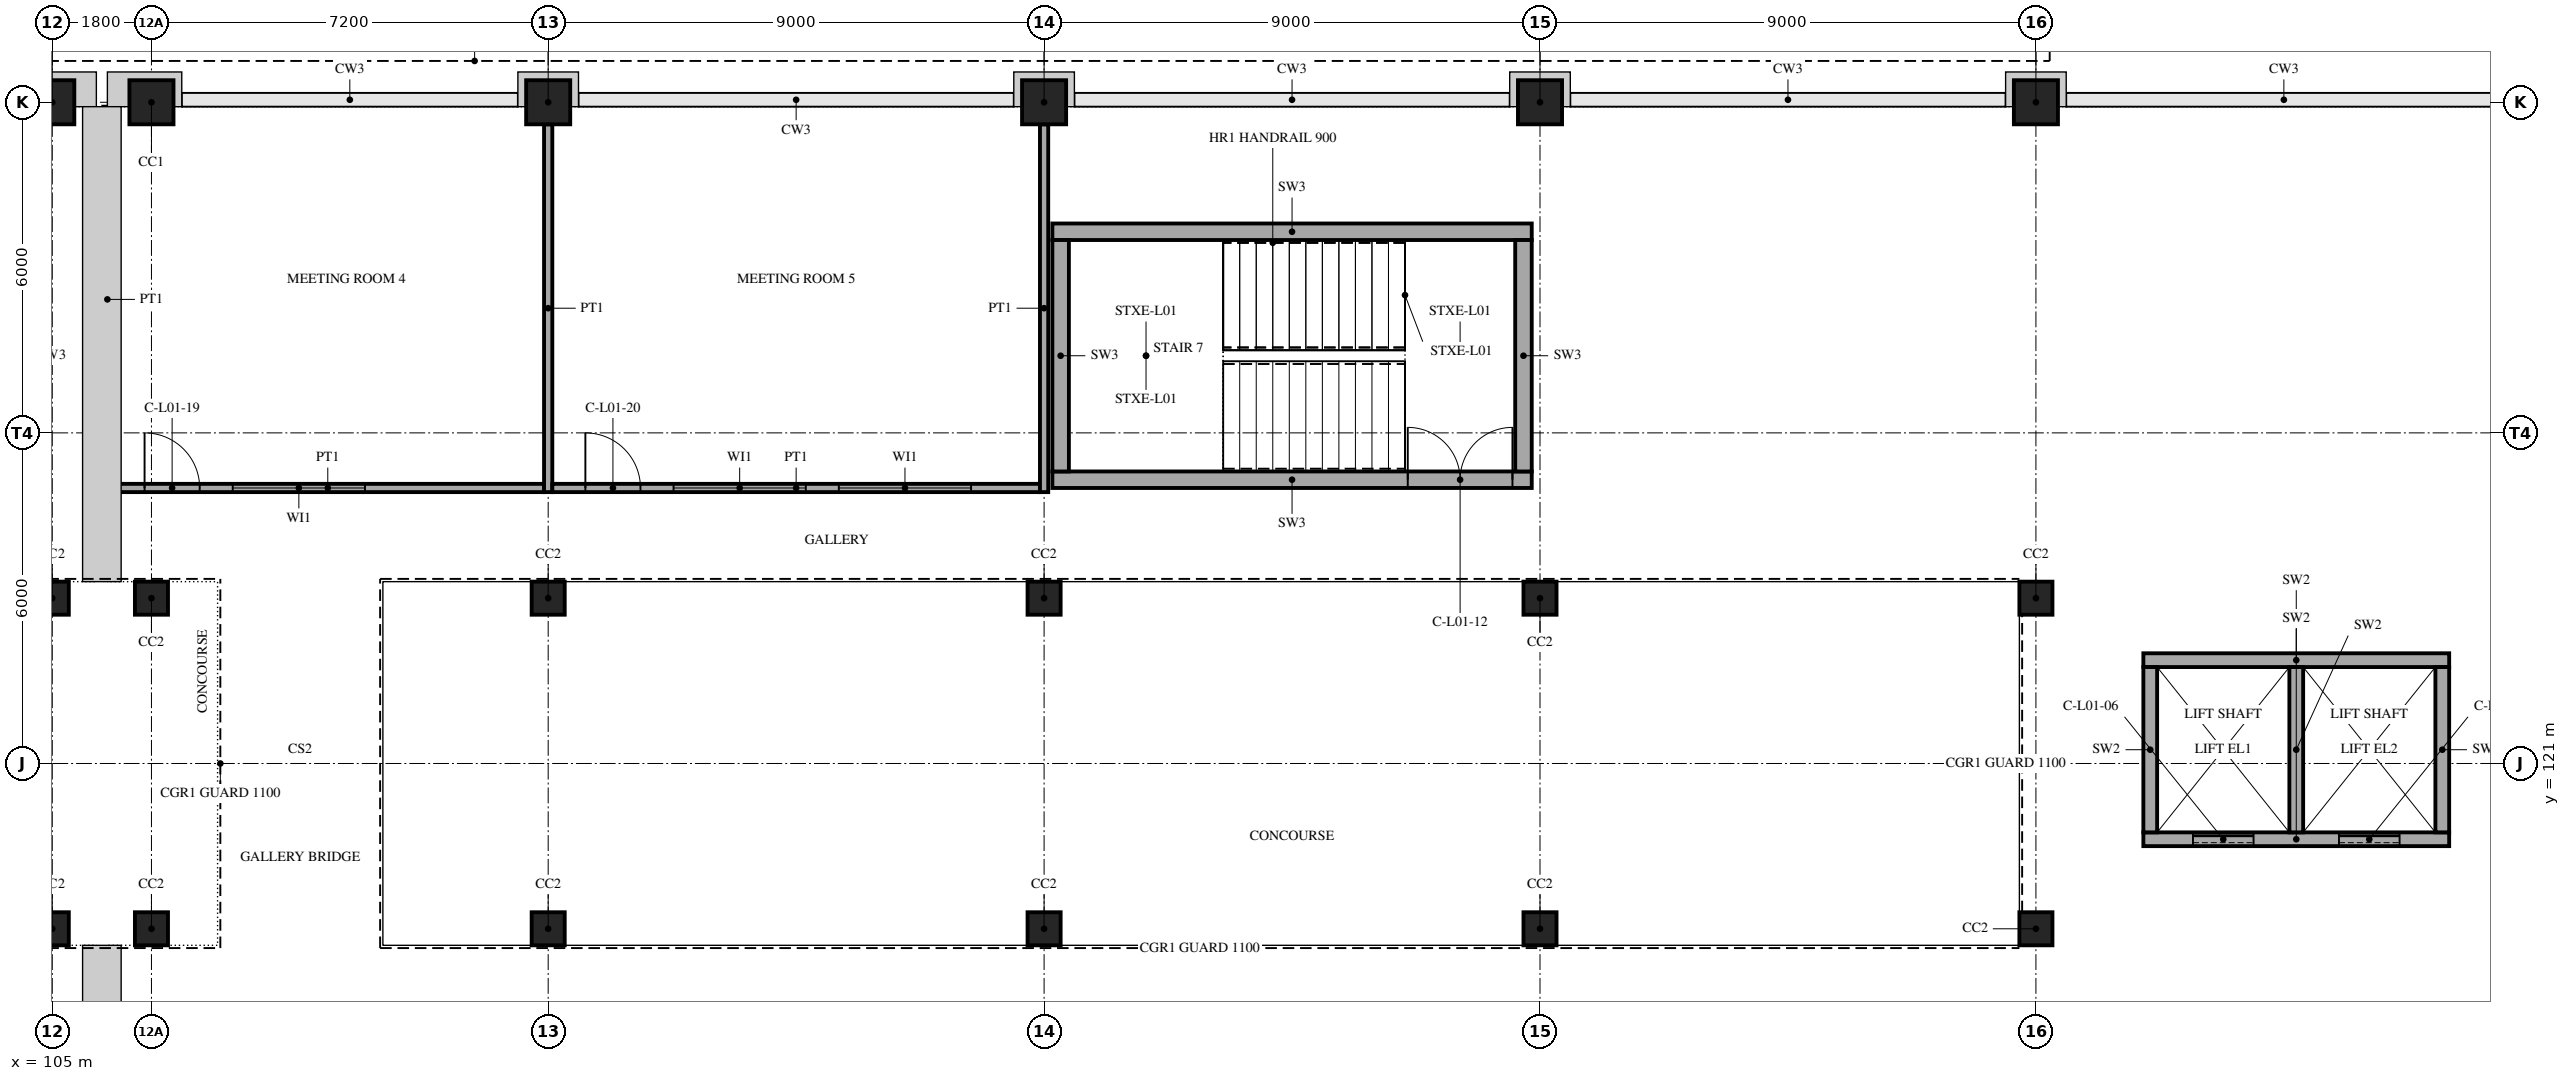
"""IFC4 building model, lengths in metres.
Left out: names, types, materials, properties, quantities, classifications, styles, units other than length and angle.
Written with IfcOpenShell. Run it as: python <this file> out.ifc"""

import sys

from ifc_helpers import new_model, si_unit, direction, frame, frame_2d, origin, origin_2d, place, context, subcontext, project, spatial, rectangle, extrude, element, fill, save


model = new_model("IFC4")
c1 = context("Model", 3, precision=1e-05, world=origin(), true_north=direction((0.0, 1.0)))
c2 = subcontext(c1, "Body", "Model", "MODEL_VIEW")
j1 = project(units=[si_unit("LENGTHUNIT", "METRE"), si_unit("PLANEANGLEUNIT", "RADIAN")], contexts=[c1])
p1 = place(None, origin())
s1 = spatial("IfcSite", under=j1, at=p1, CompositionType="ELEMENT")
p2 = place(p1, origin())
s2 = spatial("IfcBuilding", under=s1, at=p2, CompositionType="ELEMENT")
p3 = place(p2, frame((0.0, 0.0, 5.0)))
s3 = spatial("IfcBuildingStorey", under=s2, at=p3, CompositionType="ELEMENT", Elevation=5.0)
for number, where, z_axis, x_axis in (
    (1, (105.0, 118.0, 0.0), (0.0, 0.0, 1.0), (1.0, 0.0, 0.0)),
    (2, (105.0, 124.0, 0.0), (0.0, 0.0, 1.0), (1.0, 0.0, 0.0)),
):
    element("IfcColumn", number, at=place(p3, frame(where, z_axis=z_axis, x_axis=x_axis)), inside=s3, PredefinedType="COLUMN", context=c2, shape_type="SweptSolid", body=[
        extrude(rectangle(XDim=0.6, YDim=0.6, at=origin_2d()), origin(), (0.0, 0.0, 1.0), 5.0),
    ])
p4 = place(p3, frame((105.0, 133.0, 0.0), z_axis=(0.0, 0.0, 1.0), x_axis=(1.0, 0.0, 0.0)))
e3 = element("IfcColumn", 3, at=p4, inside=s3, PredefinedType="COLUMN", context=c2, shape_type="SweptSolid", body=[
    extrude(rectangle(XDim=0.8, YDim=0.8, at=origin_2d()), origin(), (0.0, 0.0, 1.0), 5.0),
])
for number, where, z_axis, x_axis in (
    (4, (106.8, 118.0, 0.0), (0.0, 0.0, 1.0), (1.0, 0.0, 0.0)),
    (5, (106.8, 124.0, 0.0), (0.0, 0.0, 1.0), (1.0, 0.0, 0.0)),
):
    element("IfcColumn", number, at=place(p3, frame(where, z_axis=z_axis, x_axis=x_axis)), inside=s3, PredefinedType="COLUMN", context=c2, shape_type="SweptSolid", body=[
        extrude(rectangle(XDim=0.6, YDim=0.6, at=origin_2d()), origin(), (0.0, 0.0, 1.0), 5.0),
    ])
p5 = place(p3, frame((106.8, 133.0, 0.0), z_axis=(0.0, 0.0, 1.0), x_axis=(1.0, 0.0, 0.0)))
e6 = element("IfcColumn", 6, at=p5, inside=s3, PredefinedType="COLUMN", context=c2, shape_type="SweptSolid", body=[
    extrude(rectangle(XDim=0.8, YDim=0.8, at=origin_2d()), origin(), (0.0, 0.0, 1.0), 5.0),
])
for number, where, z_axis, x_axis in (
    (7, (114.0, 118.0, 0.0), (0.0, 0.0, 1.0), (1.0, 0.0, 0.0)),
    (8, (114.0, 124.0, 0.0), (0.0, 0.0, 1.0), (1.0, 0.0, 0.0)),
):
    element("IfcColumn", number, at=place(p3, frame(where, z_axis=z_axis, x_axis=x_axis)), inside=s3, PredefinedType="COLUMN", context=c2, shape_type="SweptSolid", body=[
        extrude(rectangle(XDim=0.6, YDim=0.6, at=origin_2d()), origin(), (0.0, 0.0, 1.0), 5.0),
    ])
p6 = place(p3, frame((114.0, 133.0, 0.0), z_axis=(0.0, 0.0, 1.0), x_axis=(1.0, 0.0, 0.0)))
e9 = element("IfcColumn", 9, at=p6, inside=s3, PredefinedType="COLUMN", context=c2, shape_type="SweptSolid", body=[
    extrude(rectangle(XDim=0.8, YDim=0.8, at=origin_2d()), origin(), (0.0, 0.0, 1.0), 5.0),
])
for number, where, z_axis, x_axis in (
    (10, (123.0, 118.0, 0.0), (0.0, 0.0, 1.0), (1.0, 0.0, 0.0)),
    (11, (123.0, 124.0, 0.0), (0.0, 0.0, 1.0), (1.0, 0.0, 0.0)),
):
    element("IfcColumn", number, at=place(p3, frame(where, z_axis=z_axis, x_axis=x_axis)), inside=s3, PredefinedType="COLUMN", context=c2, shape_type="SweptSolid", body=[
        extrude(rectangle(XDim=0.6, YDim=0.6, at=origin_2d()), origin(), (0.0, 0.0, 1.0), 5.0),
    ])
p7 = place(p3, frame((123.0, 133.0, 0.0), z_axis=(0.0, 0.0, 1.0), x_axis=(1.0, 0.0, 0.0)))
e12 = element("IfcColumn", 12, at=p7, inside=s3, PredefinedType="COLUMN", context=c2, shape_type="SweptSolid", body=[
    extrude(rectangle(XDim=0.8, YDim=0.8, at=origin_2d()), origin(), (0.0, 0.0, 1.0), 5.0),
])
for number, where, z_axis, x_axis in (
    (13, (132.0, 118.0, 0.0), (0.0, 0.0, 1.0), (1.0, 0.0, 0.0)),
    (14, (132.0, 124.0, 0.0), (0.0, 0.0, 1.0), (1.0, 0.0, 0.0)),
):
    element("IfcColumn", number, at=place(p3, frame(where, z_axis=z_axis, x_axis=x_axis)), inside=s3, PredefinedType="COLUMN", context=c2, shape_type="SweptSolid", body=[
        extrude(rectangle(XDim=0.6, YDim=0.6, at=origin_2d()), origin(), (0.0, 0.0, 1.0), 5.0),
    ])
p8 = place(p3, frame((132.0, 133.0, 0.0), z_axis=(0.0, 0.0, 1.0), x_axis=(1.0, 0.0, 0.0)))
e15 = element("IfcColumn", 15, at=p8, inside=s3, PredefinedType="COLUMN", context=c2, shape_type="SweptSolid", body=[
    extrude(rectangle(XDim=0.8, YDim=0.8, at=origin_2d()), origin(), (0.0, 0.0, 1.0), 5.0),
])
for number, where, z_axis, x_axis in (
    (16, (141.0, 118.0, 0.0), (0.0, 0.0, 1.0), (1.0, 0.0, 0.0)),
    (17, (141.0, 124.0, 0.0), (0.0, 0.0, 1.0), (1.0, 0.0, 0.0)),
):
    element("IfcColumn", number, at=place(p3, frame(where, z_axis=z_axis, x_axis=x_axis)), inside=s3, PredefinedType="COLUMN", context=c2, shape_type="SweptSolid", body=[
        extrude(rectangle(XDim=0.6, YDim=0.6, at=origin_2d()), origin(), (0.0, 0.0, 1.0), 5.0),
    ])
p9 = place(p3, frame((141.0, 133.0, 0.0), z_axis=(0.0, 0.0, 1.0), x_axis=(1.0, 0.0, 0.0)))
e18 = element("IfcColumn", 18, at=p9, inside=s3, PredefinedType="COLUMN", context=c2, shape_type="SweptSolid", body=[
    extrude(rectangle(XDim=0.8, YDim=0.8, at=origin_2d()), origin(), (0.0, 0.0, 1.0), 5.0),
])
p10 = place(p3, frame((142.95, 119.625, 0.0), z_axis=(0.0, 0.0, 1.0), x_axis=(1.0, 0.0, 0.0)))
e19 = element("IfcWall", 19, at=p10, inside=s3, PredefinedType="SHEAR", context=c2, shape_type="SweptSolid", body=[
    extrude(rectangle(XDim=5.55, YDim=0.25, at=frame_2d((2.775, 0.0))), origin(), (0.0, 0.0, 1.0), 5.0),
])
p11 = place(p10, frame((0.9, 0.0, 0.0)))
e20 = element("IfcOpeningElement", 20, at=p11, cuts=e19, PredefinedType="OPENING", context=c2, shape_type="SweptSolid", body=[
    extrude(rectangle(XDim=1.1, YDim=2.1, at=frame_2d((0.55, 1.05))), frame((0.0, 0.135, 0.0), z_axis=(0.0, -1.0, 0.0), x_axis=(1.0, 0.0, 0.0)), (0.0, 0.0, 1.0), 0.27),
])
p12 = place(p10, frame((3.55, 0.0, 0.0)))
e21 = element("IfcOpeningElement", 21, at=p12, cuts=e19, PredefinedType="OPENING", context=c2, shape_type="SweptSolid", body=[
    extrude(rectangle(XDim=1.1, YDim=2.1, at=frame_2d((0.55, 1.05))), frame((0.0, 0.135, 0.0), z_axis=(0.0, -1.0, 0.0), x_axis=(1.0, 0.0, 0.0)), (0.0, 0.0, 1.0), 0.27),
])
p13 = place(p3, frame((142.95, 122.875, 0.0), z_axis=(0.0, 0.0, 1.0), x_axis=(1.0, 0.0, 0.0)))
e22 = element("IfcWall", 22, at=p13, inside=s3, PredefinedType="SHEAR", context=c2, shape_type="SweptSolid", body=[
    extrude(rectangle(XDim=5.55, YDim=0.25, at=frame_2d((2.775, 0.0))), origin(), (0.0, 0.0, 1.0), 5.0),
])
for number, where, z_axis, x_axis in (
    (23, (143.075, 119.75, 0.0), (0.0, 0.0, 1.0), (0.0, 1.0, 0.0)),
    (24, (148.375, 119.75, 0.0), (0.0, 0.0, 1.0), (0.0, 1.0, 0.0)),
    (25, (145.725, 119.75, 0.0), (0.0, 0.0, 1.0), (0.0, 1.0, 0.0)),
):
    element("IfcWall", number, at=place(p3, frame(where, z_axis=z_axis, x_axis=x_axis)), inside=s3, PredefinedType="SHEAR", context=c2, shape_type="SweptSolid", body=[
        extrude(rectangle(XDim=3.0, YDim=0.25, at=frame_2d((1.5, 0.0))), origin(), (0.0, 0.0, 1.0), 5.0),
    ])
p14 = place(p3, frame((123.15, 126.15, 0.0), z_axis=(0.0, 0.0, 1.0), x_axis=(1.0, 0.0, 0.0)))
e26 = element("IfcWall", 26, at=p14, inside=s3, PredefinedType="SHEAR", context=c2, shape_type="SweptSolid", body=[
    extrude(rectangle(XDim=8.7, YDim=0.3, at=frame_2d((4.35, 0.0))), origin(), (0.0, 0.0, 1.0), 5.0),
])
p15 = place(p14, frame((6.45, 0.0, 0.0)))
e27 = element("IfcOpeningElement", 27, at=p15, cuts=e26, PredefinedType="OPENING", context=c2, shape_type="SweptSolid", body=[
    extrude(rectangle(XDim=1.9, YDim=2.1, at=frame_2d((0.95, 1.05))), frame((0.0, 0.16, 0.0), z_axis=(0.0, -1.0, 0.0), x_axis=(1.0, 0.0, 0.0)), (0.0, 0.0, 1.0), 0.32),
])
p16 = place(p3, frame((123.15, 130.65, 0.0), z_axis=(0.0, 0.0, 1.0), x_axis=(1.0, 0.0, 0.0)))
e28 = element("IfcWall", 28, at=p16, inside=s3, PredefinedType="SHEAR", context=c2, shape_type="SweptSolid", body=[
    extrude(rectangle(XDim=8.7, YDim=0.3, at=frame_2d((4.35, 0.0))), origin(), (0.0, 0.0, 1.0), 5.0),
])
for number, where, z_axis, x_axis in (
    (29, (123.3, 126.3, 0.0), (0.0, 0.0, 1.0), (0.0, 1.0, 0.0)),
    (30, (131.7, 126.3, 0.0), (0.0, 0.0, 1.0), (0.0, 1.0, 0.0)),
):
    element("IfcWall", number, at=place(p3, frame(where, z_axis=z_axis, x_axis=x_axis)), inside=s3, PredefinedType="SHEAR", context=c2, shape_type="SweptSolid", body=[
        extrude(rectangle(XDim=4.2, YDim=0.3, at=frame_2d((2.1, 0.0))), origin(), (0.0, 0.0, 1.0), 5.0),
    ])
p17 = place(p3, frame((106.075, 126.0, 0.0), z_axis=(0.0, 0.0, 1.0), x_axis=(1.0, 0.0, 0.0)))
e31 = element("IfcWall", 31, at=p17, inside=s3, PredefinedType="PARTITIONING", context=c2, shape_type="SweptSolid", body=[
    extrude(rectangle(XDim=7.85, YDim=0.15, at=frame_2d((3.925, 0.0))), origin(), (0.0, 0.0, 1.0), 4.8),
])
p18 = place(p17, frame((0.6, 0.0, 0.0)))
e32 = element("IfcOpeningElement", 32, at=p18, cuts=e31, PredefinedType="OPENING", context=c2, shape_type="SweptSolid", body=[
    extrude(rectangle(XDim=1.0, YDim=2.1, at=frame_2d((0.5, 1.05))), frame((0.0, 0.085, 0.0), z_axis=(0.0, -1.0, 0.0), x_axis=(1.0, 0.0, 0.0)), (0.0, 0.0, 1.0), 0.17),
])
p19 = place(p17, frame((2.2, 0.0, 0.9)))
e33 = element("IfcOpeningElement", 33, at=p19, cuts=e31, PredefinedType="OPENING", context=c2, shape_type="SweptSolid", body=[
    extrude(rectangle(XDim=2.4, YDim=1.5, at=frame_2d((1.2, 0.75))), frame((0.0, 0.085, 0.0), z_axis=(0.0, -1.0, 0.0), x_axis=(1.0, 0.0, 0.0)), (0.0, 0.0, 1.0), 0.17),
])
p20 = place(p3, frame((106.0, 125.925, 0.0), z_axis=(0.0, 0.0, 1.0), x_axis=(0.0, 1.0, 0.0)))
e34 = element("IfcWall", 34, at=p20, inside=s3, PredefinedType="PARTITIONING", context=c2, shape_type="SweptSolid", body=[
    extrude(rectangle(XDim=6.995, YDim=0.15, at=frame_2d((3.498, 0.0))), origin(), (0.0, 0.0, 1.0), 4.8),
])
p21 = place(p3, frame((114.0, 125.925, 0.0), z_axis=(0.0, 0.0, 1.0), x_axis=(0.0, 1.0, 0.0)))
e35 = element("IfcWall", 35, at=p21, inside=s3, PredefinedType="PARTITIONING", context=c2, shape_type="SweptSolid", body=[
    extrude(rectangle(XDim=6.675, YDim=0.15, at=frame_2d((3.337, 0.0))), origin(), (0.0, 0.0, 1.0), 4.0),
])
p22 = place(p3, frame((114.075, 126.0, 0.0), z_axis=(0.0, 0.0, 1.0), x_axis=(1.0, 0.0, 0.0)))
e36 = element("IfcWall", 36, at=p22, inside=s3, PredefinedType="PARTITIONING", context=c2, shape_type="SweptSolid", body=[
    extrude(rectangle(XDim=8.85, YDim=0.15, at=frame_2d((4.425, 0.0))), origin(), (0.0, 0.0, 1.0), 4.8),
])
p23 = place(p22, frame((0.6, 0.0, 0.0)))
e37 = element("IfcOpeningElement", 37, at=p23, cuts=e36, PredefinedType="OPENING", context=c2, shape_type="SweptSolid", body=[
    extrude(rectangle(XDim=1.0, YDim=2.1, at=frame_2d((0.5, 1.05))), frame((0.0, 0.085, 0.0), z_axis=(0.0, -1.0, 0.0), x_axis=(1.0, 0.0, 0.0)), (0.0, 0.0, 1.0), 0.17),
])
p24 = place(p22, frame((2.2, 0.0, 0.9)))
e38 = element("IfcOpeningElement", 38, at=p24, cuts=e36, PredefinedType="OPENING", context=c2, shape_type="SweptSolid", body=[
    extrude(rectangle(XDim=2.4, YDim=1.5, at=frame_2d((1.2, 0.75))), frame((0.0, 0.085, 0.0), z_axis=(0.0, -1.0, 0.0), x_axis=(1.0, 0.0, 0.0)), (0.0, 0.0, 1.0), 0.17),
])
p25 = place(p22, frame((5.2, 0.0, 0.9)))
e39 = element("IfcOpeningElement", 39, at=p25, cuts=e36, PredefinedType="OPENING", context=c2, shape_type="SweptSolid", body=[
    extrude(rectangle(XDim=2.4, YDim=1.5, at=frame_2d((1.2, 0.75))), frame((0.0, 0.085, 0.0), z_axis=(0.0, -1.0, 0.0), x_axis=(1.0, 0.0, 0.0)), (0.0, 0.0, 1.0), 0.17),
])
p26 = place(p3, frame((123.0, 125.925, 0.0), z_axis=(0.0, 0.0, 1.0), x_axis=(0.0, 1.0, 0.0)))
e40 = element("IfcWall", 40, at=p26, inside=s3, PredefinedType="PARTITIONING", context=c2, shape_type="SweptSolid", body=[
    extrude(rectangle(XDim=6.675, YDim=0.15, at=frame_2d((3.337, 0.0))), origin(), (0.0, 0.0, 1.0), 4.0),
])
p27 = place(p11, origin())
e41 = element("IfcDoor", 41, at=p27, inside=s3, OperationType="DOUBLE_DOOR_SLIDING", PredefinedType="NOTDEFINED", context=c2, shape_type="SweptSolid", body=[
    extrude(rectangle(XDim=1.1, YDim=2.1, at=frame_2d((0.55, 1.05))), frame((0.0, 0.025, 0.0), z_axis=(0.0, -1.0, 0.0), x_axis=(1.0, 0.0, 0.0)), (0.0, 0.0, 1.0), 0.05),
])
fill(e20, e41)
p28 = place(p12, origin())
e42 = element("IfcDoor", 42, at=p28, inside=s3, OperationType="DOUBLE_DOOR_SLIDING", PredefinedType="NOTDEFINED", context=c2, shape_type="SweptSolid", body=[
    extrude(rectangle(XDim=1.1, YDim=2.1, at=frame_2d((0.55, 1.05))), frame((0.0, 0.025, 0.0), z_axis=(0.0, -1.0, 0.0), x_axis=(1.0, 0.0, 0.0)), (0.0, 0.0, 1.0), 0.05),
])
fill(e21, e42)
p29 = place(p15, origin())
e43 = element("IfcDoor", 43, at=p29, inside=s3, OperationType="DOUBLE_DOOR_SINGLE_SWING", PredefinedType="NOTDEFINED", context=c2, shape_type="SweptSolid", body=[
    extrude(rectangle(XDim=1.9, YDim=2.1, at=frame_2d((0.95, 1.05))), frame((0.0, 0.025, 0.0), z_axis=(0.0, -1.0, 0.0), x_axis=(1.0, 0.0, 0.0)), (0.0, 0.0, 1.0), 0.05),
])
fill(e27, e43)
p30 = place(p18, origin())
e44 = element("IfcDoor", 44, at=p30, inside=s3, OperationType="SINGLE_SWING_LEFT", PredefinedType="NOTDEFINED", context=c2, shape_type="SweptSolid", body=[
    extrude(rectangle(XDim=1.0, YDim=2.1, at=frame_2d((0.5, 1.05))), frame((0.0, 0.025, 0.0), z_axis=(0.0, -1.0, 0.0), x_axis=(1.0, 0.0, 0.0)), (0.0, 0.0, 1.0), 0.05),
])
fill(e32, e44)
p31 = place(p19, origin())
e45 = element("IfcWindow", 45, at=p31, inside=s3, PartitioningType="SINGLE_PANEL", PredefinedType="WINDOW", context=c2, shape_type="SweptSolid", body=[
    extrude(rectangle(XDim=2.4, YDim=1.5, at=frame_2d((1.2, 0.75))), frame((0.0, 0.03, 0.0), z_axis=(0.0, -1.0, 0.0), x_axis=(1.0, 0.0, 0.0)), (0.0, 0.0, 1.0), 0.06),
])
fill(e33, e45)
p32 = place(p23, origin())
e46 = element("IfcDoor", 46, at=p32, inside=s3, OperationType="SINGLE_SWING_LEFT", PredefinedType="NOTDEFINED", context=c2, shape_type="SweptSolid", body=[
    extrude(rectangle(XDim=1.0, YDim=2.1, at=frame_2d((0.5, 1.05))), frame((0.0, 0.025, 0.0), z_axis=(0.0, -1.0, 0.0), x_axis=(1.0, 0.0, 0.0)), (0.0, 0.0, 1.0), 0.05),
])
fill(e37, e46)
p33 = place(p24, origin())
e47 = element("IfcWindow", 47, at=p33, inside=s3, PartitioningType="SINGLE_PANEL", PredefinedType="WINDOW", context=c2, shape_type="SweptSolid", body=[
    extrude(rectangle(XDim=2.4, YDim=1.5, at=frame_2d((1.2, 0.75))), frame((0.0, 0.03, 0.0), z_axis=(0.0, -1.0, 0.0), x_axis=(1.0, 0.0, 0.0)), (0.0, 0.0, 1.0), 0.06),
])
fill(e38, e47)
p34 = place(p25, origin())
e48 = element("IfcWindow", 48, at=p34, inside=s3, PartitioningType="SINGLE_PANEL", PredefinedType="WINDOW", context=c2, shape_type="SweptSolid", body=[
    extrude(rectangle(XDim=2.4, YDim=1.5, at=frame_2d((1.2, 0.75))), frame((0.0, 0.03, 0.0), z_axis=(0.0, -1.0, 0.0), x_axis=(1.0, 0.0, 0.0)), (0.0, 0.0, 1.0), 0.06),
])
fill(e39, e48)
save(model, sys.argv[1])
